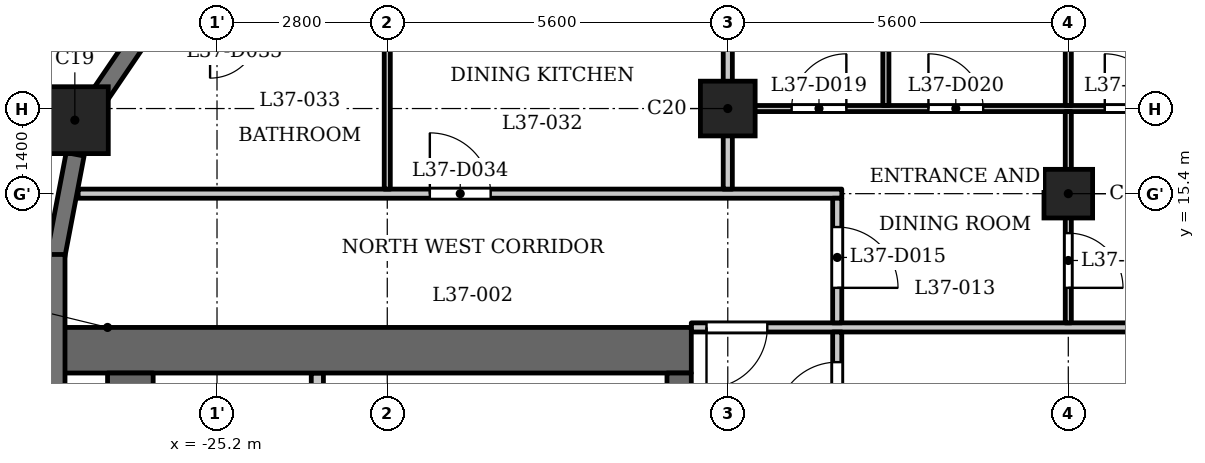
"""IFC4 building model, lengths in metres.
Left out: names, types, materials, properties, quantities, classifications, styles, units other than length and angle.
Written with IfcOpenShell. Run it as: python <this file> out.ifc"""

import sys

from ifc_helpers import new_model, si_unit, direction, frame, frame_2d, origin, origin_2d, place, context, subcontext, project, spatial, rectangle, extrude, element, fill, save


model = new_model("IFC4")
c1 = context("Model", 3, precision=1e-05, world=origin(), true_north=direction((0.0, 1.0)))
c2 = subcontext(c1, "Body", "Model", "MODEL_VIEW")
j1 = project(units=[si_unit("LENGTHUNIT", "METRE"), si_unit("PLANEANGLEUNIT", "RADIAN")], contexts=[c1])
p1 = place(None, origin())
s1 = spatial("IfcSite", under=j1, at=p1, CompositionType="ELEMENT")
p2 = place(p1, origin())
s2 = spatial("IfcBuilding", under=s1, at=p2, CompositionType="ELEMENT")
p3 = place(p2, frame((0.0, 0.0, 146.6)))
s3 = spatial("IfcBuildingStorey", under=s2, at=p3, CompositionType="ELEMENT", Elevation=146.6)
p4 = place(p3, frame((-27.538, 16.609, 0.0), z_axis=(0.0, 0.0, 1.0), x_axis=(1.0, 0.0, 0.0)))
e1 = element("IfcColumn", 1, at=p4, inside=s3, PredefinedType="COLUMN", context=c2, shape_type="SweptSolid", body=[
    extrude(rectangle(XDim=1.1, YDim=1.1, at=origin_2d()), origin(), (0.0, 0.0, 1.0), 3.5),
])
p5 = place(p3, frame((-16.8, 16.8, 0.0), z_axis=(0.0, 0.0, 1.0), x_axis=(1.0, 0.0, 0.0)))
e2 = element("IfcColumn", 2, at=p5, inside=s3, PredefinedType="COLUMN", context=c2, shape_type="SweptSolid", body=[
    extrude(rectangle(XDim=0.9, YDim=0.9, at=origin_2d()), origin(), (0.0, 0.0, 1.0), 3.5),
])
p6 = place(p3, frame((-11.2, 15.4, 0.0), z_axis=(0.0, 0.0, 1.0), x_axis=(1.0, 0.0, 0.0)))
e3 = element("IfcColumn", 3, at=p6, inside=s3, PredefinedType="COLUMN", context=c2, shape_type="SweptSolid", body=[
    extrude(rectangle(XDim=0.8, YDim=0.8, at=origin_2d()), origin(), (0.0, 0.0, 1.0), 3.5),
])
p7 = place(p3, frame((-26.532, 17.893, 0.0), z_axis=(0.0, 0.0, 1.0), x_axis=(-0.562105419172, -0.82706559458, 0.0)))
e4 = element("IfcWall", 4, at=p7, inside=s3, PredefinedType="SOLIDWALL", context=c2, shape_type="SweptSolid", body=[
    extrude(rectangle(XDim=1.077, YDim=0.3, at=frame_2d((0.539, 0.0))), origin(), (0.0, 0.0, 1.0), 3.2),
])
p8 = place(p3, frame((-27.533, 16.048, 0.0), z_axis=(0.0, 0.0, 1.0), x_axis=(-0.187302784601, -0.982302227871, 0.0)))
e5 = element("IfcWall", 5, at=p8, inside=s3, PredefinedType="SOLIDWALL", context=c2, shape_type="SweptSolid", body=[
    extrude(rectangle(XDim=1.706, YDim=0.3, at=frame_2d((0.853, 0.0))), origin(), (0.0, 0.0, 1.0), 2.45),
])
p9 = place(p3, frame((-27.85, 14.4, 0.0), z_axis=(0.0, 0.0, 1.0), x_axis=(0.0, -1.0, 0.0)))
e6 = element("IfcWall", 6, at=p9, inside=s3, PredefinedType="SOLIDWALL", context=c2, shape_type="SweptSolid", body=[
    extrude(rectangle(XDim=2.65, YDim=0.3, at=frame_2d((1.325, 0.0))), origin(), (0.0, 0.0, 1.0), 2.45),
])
p10 = place(p3, frame((-17.4, 12.825, 0.0), z_axis=(0.0, 0.0, 1.0), x_axis=(-1.0, 0.0, 0.0)))
e7 = element("IfcWall", 7, at=p10, inside=s3, PredefinedType="SHEAR", context=c2, shape_type="SweptSolid", body=[
    extrude(rectangle(XDim=10.4, YDim=0.75, at=frame_2d((5.2, 0.0))), origin(), (0.0, 0.0, 1.0), 3.2),
])
p11 = place(p3, frame((-17.6, -12.45, 0.0), z_axis=(0.0, 0.0, 1.0), x_axis=(0.0, 1.0, 0.0)))
e8 = element("IfcWall", 8, at=p11, inside=s3, PredefinedType="SHEAR", context=c2, shape_type="SweptSolid", body=[
    extrude(rectangle(XDim=24.9, YDim=0.4, at=frame_2d((12.45, 0.0))), origin(), (0.0, 0.0, 1.0), 3.2),
])
p12 = place(p11, frame((6.325, 0.0, 0.0)))
e9 = element("IfcOpeningElement", 9, at=p12, cuts=e8, PredefinedType="OPENING", context=c2, shape_type="SweptSolid", body=[
    extrude(rectangle(XDim=0.9, YDim=2.1, at=frame_2d((0.45, 1.05))), frame((0.0, 0.21, 0.0), z_axis=(0.0, -1.0, 0.0), x_axis=(1.0, 0.0, 0.0)), (0.0, 0.0, 1.0), 0.42),
])
p13 = place(p11, frame((9.925, 0.0, 0.0)))
e10 = element("IfcOpeningElement", 10, at=p13, cuts=e8, PredefinedType="OPENING", context=c2, shape_type="SweptSolid", body=[
    extrude(rectangle(XDim=0.9, YDim=2.1, at=frame_2d((0.45, 1.05))), frame((0.0, 0.21, 0.0), z_axis=(0.0, -1.0, 0.0), x_axis=(1.0, 0.0, 0.0)), (0.0, 0.0, 1.0), 0.42),
])
p14 = place(p11, frame((15.6, 0.0, 0.0)))
e11 = element("IfcOpeningElement", 11, at=p14, cuts=e8, PredefinedType="OPENING", context=c2, shape_type="SweptSolid", body=[
    extrude(rectangle(XDim=1.1, YDim=2.1, at=frame_2d((0.55, 1.05))), frame((0.0, 0.21, 0.0), z_axis=(0.0, -1.0, 0.0), x_axis=(1.0, 0.0, 0.0)), (0.0, 0.0, 1.0), 0.42),
])
p15 = place(p11, frame((18.0, 0.0, 0.0)))
e12 = element("IfcOpeningElement", 12, at=p15, cuts=e8, PredefinedType="OPENING", context=c2, shape_type="SweptSolid", body=[
    extrude(rectangle(XDim=1.1, YDim=2.1, at=frame_2d((0.55, 1.05))), frame((0.0, 0.21, 0.0), z_axis=(0.0, -1.0, 0.0), x_axis=(1.0, 0.0, 0.0)), (0.0, 0.0, 1.0), 0.42),
])
p16 = place(p11, frame((23.025, 0.0, 0.0)))
e13 = element("IfcOpeningElement", 13, at=p16, cuts=e8, PredefinedType="OPENING", context=c2, shape_type="SweptSolid", body=[
    extrude(rectangle(XDim=1.1, YDim=2.1, at=frame_2d((0.55, 1.05))), frame((0.0, 0.21, 0.0), z_axis=(0.0, -1.0, 0.0), x_axis=(1.0, 0.0, 0.0)), (0.0, 0.0, 1.0), 0.42),
])
p17 = place(p11, frame((0.775, 0.0, 0.0)))
e14 = element("IfcOpeningElement", 14, at=p17, cuts=e8, PredefinedType="OPENING", context=c2, shape_type="SweptSolid", body=[
    extrude(rectangle(XDim=1.1, YDim=2.1, at=frame_2d((0.55, 1.05))), frame((0.0, 0.21, 0.0), z_axis=(0.0, -1.0, 0.0), x_axis=(1.0, 0.0, 0.0)), (0.0, 0.0, 1.0), 0.42),
])
p18 = place(p11, frame((12.925, 0.0, 0.0)))
e15 = element("IfcOpeningElement", 15, at=p18, cuts=e8, PredefinedType="OPENING", context=c2, shape_type="SweptSolid", body=[
    extrude(rectangle(XDim=1.8, YDim=2.1, at=frame_2d((0.9, 1.05))), frame((0.0, 0.21, 0.0), z_axis=(0.0, -1.0, 0.0), x_axis=(1.0, 0.0, 0.0)), (0.0, 0.0, 1.0), 0.42),
])
p19 = place(p3, frame((-26.625, -12.45, 0.0), z_axis=(0.0, 0.0, 1.0), x_axis=(0.0, 1.0, 0.0)))
e16 = element("IfcWall", 16, at=p19, inside=s3, PredefinedType="SHEAR", context=c2, shape_type="SweptSolid", body=[
    extrude(rectangle(XDim=24.9, YDim=0.75, at=frame_2d((12.45, 0.0))), origin(), (0.0, 0.0, 1.0), 3.2),
])
p20 = place(p3, frame((-23.55, 9.8, 0.0), z_axis=(0.0, 0.0, 1.0), x_axis=(0.0, 1.0, 0.0)))
e17 = element("IfcWall", 17, at=p20, inside=s3, PredefinedType="PARTITIONING", context=c2, shape_type="SweptSolid", body=[
    extrude(rectangle(XDim=2.65, YDim=0.2, at=frame_2d((1.325, 0.0))), origin(), (0.0, 0.0, 1.0), 3.2),
])
p21 = place(p20, frame((0.875, 0.0, 0.0)))
e18 = element("IfcOpeningElement", 18, at=p21, cuts=e17, PredefinedType="OPENING", context=c2, shape_type="SweptSolid", body=[
    extrude(rectangle(XDim=0.9, YDim=2.1, at=frame_2d((0.45, 1.05))), frame((0.0, 0.11, 0.0), z_axis=(0.0, -1.0, 0.0), x_axis=(1.0, 0.0, 0.0)), (0.0, 0.0, 1.0), 0.22),
])
p22 = place(p3, frame((-17.4, 13.2, 0.0), z_axis=(0.0, 0.0, 1.0), x_axis=(1.0, 0.0, 0.0)))
e19 = element("IfcWall", 19, at=p22, inside=s3, PredefinedType="PARTITIONING", context=c2, shape_type="SweptSolid", body=[
    extrude(rectangle(XDim=34.8, YDim=0.15, at=frame_2d((17.4, 0.0))), origin(), (0.0, 0.0, 1.0), 3.2),
])
p23 = place(p22, frame((0.25, 0.0, 0.0)))
e20 = element("IfcOpeningElement", 20, at=p23, cuts=e19, PredefinedType="OPENING", context=c2, shape_type="SweptSolid", body=[
    extrude(rectangle(XDim=1.0, YDim=2.1, at=frame_2d((0.5, 1.05))), frame((0.0, 0.085, 0.0), z_axis=(0.0, -1.0, 0.0), x_axis=(1.0, 0.0, 0.0)), (0.0, 0.0, 1.0), 0.17),
])
p24 = place(p22, frame((33.65, 0.0, 0.0)))
e21 = element("IfcOpeningElement", 21, at=p24, cuts=e19, PredefinedType="OPENING", context=c2, shape_type="SweptSolid", body=[
    extrude(rectangle(XDim=1.0, YDim=2.1, at=frame_2d((0.5, 1.05))), frame((0.0, 0.085, 0.0), z_axis=(0.0, -1.0, 0.0), x_axis=(1.0, 0.0, 0.0)), (0.0, 0.0, 1.0), 0.17),
])
p25 = place(p22, frame((13.75, 0.0, 0.0)))
e22 = element("IfcOpeningElement", 22, at=p25, cuts=e19, PredefinedType="OPENING", context=c2, shape_type="SweptSolid", body=[
    extrude(rectangle(XDim=1.0, YDim=2.1, at=frame_2d((0.5, 1.05))), frame((0.0, 0.085, 0.0), z_axis=(0.0, -1.0, 0.0), x_axis=(1.0, 0.0, 0.0)), (0.0, 0.0, 1.0), 0.17),
])
p26 = place(p3, frame((-27.484, 15.4, 0.0), z_axis=(0.0, 0.0, 1.0), x_axis=(1.0, 0.0, 0.0)))
e23 = element("IfcWall", 23, at=p26, inside=s3, PredefinedType="PARTITIONING", context=c2, shape_type="SweptSolid", body=[
    extrude(rectangle(XDim=12.559, YDim=0.15, at=frame_2d((6.279, 0.0))), origin(), (0.0, 0.0, 1.0), 3.2),
])
p27 = place(p26, frame((5.784, 0.0, 0.0)))
e24 = element("IfcOpeningElement", 24, at=p27, cuts=e23, PredefinedType="OPENING", context=c2, shape_type="SweptSolid", body=[
    extrude(rectangle(XDim=1.0, YDim=2.1, at=frame_2d((0.5, 1.05))), frame((0.0, 0.085, 0.0), z_axis=(0.0, -1.0, 0.0), x_axis=(1.0, 0.0, 0.0)), (0.0, 0.0, 1.0), 0.17),
])
p28 = place(p3, frame((-16.725, 16.8, 0.0), z_axis=(0.0, 0.0, 1.0), x_axis=(1.0, 0.0, 0.0)))
e25 = element("IfcWall", 25, at=p28, inside=s3, PredefinedType="PARTITIONING", context=c2, shape_type="SweptSolid", body=[
    extrude(rectangle(XDim=33.45, YDim=0.1, at=frame_2d((16.725, 0.0))), origin(), (0.0, 0.0, 1.0), 3.2),
])
p29 = place(p28, frame((9.575, 0.0, 0.0)))
e26 = element("IfcOpeningElement", 26, at=p29, cuts=e25, PredefinedType="OPENING", context=c2, shape_type="SweptSolid", body=[
    extrude(rectangle(XDim=0.8, YDim=2.1, at=frame_2d((0.4, 1.05))), frame((0.0, 0.06, 0.0), z_axis=(0.0, -1.0, 0.0), x_axis=(1.0, 0.0, 0.0)), (0.0, 0.0, 1.0), 0.12),
])
p30 = place(p28, frame((6.125, 0.0, 0.0)))
e27 = element("IfcOpeningElement", 27, at=p30, cuts=e25, PredefinedType="OPENING", context=c2, shape_type="SweptSolid", body=[
    extrude(rectangle(XDim=0.9, YDim=2.1, at=frame_2d((0.45, 1.05))), frame((0.0, 0.06, 0.0), z_axis=(0.0, -1.0, 0.0), x_axis=(1.0, 0.0, 0.0)), (0.0, 0.0, 1.0), 0.12),
])
p31 = place(p28, frame((0.975, 0.0, 0.0)))
e28 = element("IfcOpeningElement", 28, at=p31, cuts=e25, PredefinedType="OPENING", context=c2, shape_type="SweptSolid", body=[
    extrude(rectangle(XDim=0.9, YDim=2.1, at=frame_2d((0.45, 1.05))), frame((0.0, 0.06, 0.0), z_axis=(0.0, -1.0, 0.0), x_axis=(1.0, 0.0, 0.0)), (0.0, 0.0, 1.0), 0.12),
])
p32 = place(p28, frame((3.225, 0.0, 0.0)))
e29 = element("IfcOpeningElement", 29, at=p32, cuts=e25, PredefinedType="OPENING", context=c2, shape_type="SweptSolid", body=[
    extrude(rectangle(XDim=0.9, YDim=2.1, at=frame_2d((0.45, 1.05))), frame((0.0, 0.06, 0.0), z_axis=(0.0, -1.0, 0.0), x_axis=(1.0, 0.0, 0.0)), (0.0, 0.0, 1.0), 0.12),
])
p33 = place(p28, frame((15.375, 0.0, 0.0)))
e30 = element("IfcOpeningElement", 30, at=p33, cuts=e25, PredefinedType="OPENING", context=c2, shape_type="SweptSolid", body=[
    extrude(rectangle(XDim=0.8, YDim=2.1, at=frame_2d((0.4, 1.05))), frame((0.0, 0.06, 0.0), z_axis=(0.0, -1.0, 0.0), x_axis=(1.0, 0.0, 0.0)), (0.0, 0.0, 1.0), 0.12),
])
p34 = place(p28, frame((13.175, 0.0, 0.0)))
e31 = element("IfcOpeningElement", 31, at=p34, cuts=e25, PredefinedType="OPENING", context=c2, shape_type="SweptSolid", body=[
    extrude(rectangle(XDim=0.9, YDim=2.1, at=frame_2d((0.45, 1.05))), frame((0.0, 0.06, 0.0), z_axis=(0.0, -1.0, 0.0), x_axis=(1.0, 0.0, 0.0)), (0.0, 0.0, 1.0), 0.12),
])
p35 = place(p28, frame((31.975, 0.0, 0.0)))
e32 = element("IfcOpeningElement", 32, at=p35, cuts=e25, PredefinedType="OPENING", context=c2, shape_type="SweptSolid", body=[
    extrude(rectangle(XDim=0.9, YDim=2.1, at=frame_2d((0.45, 1.05))), frame((0.0, 0.06, 0.0), z_axis=(0.0, -1.0, 0.0), x_axis=(1.0, 0.0, 0.0)), (0.0, 0.0, 1.0), 0.12),
])
p36 = place(p28, frame((22.875, 0.0, 0.0)))
e33 = element("IfcOpeningElement", 33, at=p36, cuts=e25, PredefinedType="OPENING", context=c2, shape_type="SweptSolid", body=[
    extrude(rectangle(XDim=0.9, YDim=2.1, at=frame_2d((0.45, 1.05))), frame((0.0, 0.06, 0.0), z_axis=(0.0, -1.0, 0.0), x_axis=(1.0, 0.0, 0.0)), (0.0, 0.0, 1.0), 0.12),
])
p37 = place(p3, frame((-22.4, 15.475, 0.0), z_axis=(0.0, 0.0, 1.0), x_axis=(0.0, 1.0, 0.0)))
e34 = element("IfcWall", 34, at=p37, inside=s3, PredefinedType="PARTITIONING", context=c2, shape_type="SweptSolid", body=[
    extrude(rectangle(XDim=2.575, YDim=0.1, at=frame_2d((1.288, 0.0))), origin(), (0.0, 0.0, 1.0), 3.2),
])
p38 = place(p3, frame((-16.8, 15.475, 0.0), z_axis=(0.0, 0.0, 1.0), x_axis=(0.0, 1.0, 0.0)))
e35 = element("IfcWall", 35, at=p38, inside=s3, PredefinedType="PARTITIONING", context=c2, shape_type="SweptSolid", body=[
    extrude(rectangle(XDim=7.455, YDim=0.15, at=frame_2d((3.728, 0.0))), origin(), (0.0, 0.0, 1.0), 3.2),
])
p39 = place(p3, frame((-15.0, 6.769, 0.0), z_axis=(0.0, 0.0, 1.0), x_axis=(0.0, 1.0, 0.0)))
e36 = element("IfcWall", 36, at=p39, inside=s3, PredefinedType="PARTITIONING", context=c2, shape_type="SweptSolid", body=[
    extrude(rectangle(XDim=6.356, YDim=0.15, at=frame_2d((3.178, 0.0))), origin(), (0.0, 0.0, 1.0), 3.2),
])
p40 = place(p39, frame((4.86, 0.0, 0.0)))
e37 = element("IfcOpeningElement", 37, at=p40, cuts=e36, PredefinedType="OPENING", context=c2, shape_type="SweptSolid", body=[
    extrude(rectangle(XDim=1.0, YDim=2.1, at=frame_2d((0.5, 1.05))), frame((0.0, 0.085, 0.0), z_axis=(0.0, -1.0, 0.0), x_axis=(1.0, 0.0, 0.0)), (0.0, 0.0, 1.0), 0.17),
])
p41 = place(p3, frame((-15.0, 13.275, 0.0), z_axis=(0.0, 0.0, 1.0), x_axis=(0.0, 1.0, 0.0)))
e38 = element("IfcWall", 38, at=p41, inside=s3, PredefinedType="PARTITIONING", context=c2, shape_type="SweptSolid", body=[
    extrude(rectangle(XDim=2.05, YDim=0.15, at=frame_2d((1.025, 0.0))), origin(), (0.0, 0.0, 1.0), 3.2),
])
p42 = place(p41, frame((0.576, 0.0, 0.0)))
e39 = element("IfcOpeningElement", 39, at=p42, cuts=e38, PredefinedType="OPENING", context=c2, shape_type="SweptSolid", body=[
    extrude(rectangle(XDim=1.0, YDim=2.1, at=frame_2d((0.5, 1.05))), frame((0.0, 0.085, 0.0), z_axis=(0.0, -1.0, 0.0), x_axis=(1.0, 0.0, 0.0)), (0.0, 0.0, 1.0), 0.17),
])
p43 = place(p3, frame((-14.2, 16.85, 0.0), z_axis=(0.0, 0.0, 1.0), x_axis=(0.0, 1.0, 0.0)))
e40 = element("IfcWall", 40, at=p43, inside=s3, PredefinedType="PARTITIONING", context=c2, shape_type="SweptSolid", body=[
    extrude(rectangle(XDim=5.23, YDim=0.1, at=frame_2d((2.615, 0.0))), origin(), (0.0, 0.0, 1.0), 3.2),
])
p44 = place(p3, frame((-11.2, 13.275, 0.0), z_axis=(0.0, 0.0, 1.0), x_axis=(0.0, 1.0, 0.0)))
e41 = element("IfcWall", 41, at=p44, inside=s3, PredefinedType="PARTITIONING", context=c2, shape_type="SweptSolid", body=[
    extrude(rectangle(XDim=3.475, YDim=0.1, at=frame_2d((1.738, 0.0))), origin(), (0.0, 0.0, 1.0), 3.2),
])
p45 = place(p44, frame((0.576, 0.0, 0.0)))
e42 = element("IfcOpeningElement", 42, at=p45, cuts=e41, PredefinedType="OPENING", context=c2, shape_type="SweptSolid", body=[
    extrude(rectangle(XDim=0.9, YDim=2.1, at=frame_2d((0.45, 1.05))), frame((0.0, 0.06, 0.0), z_axis=(0.0, -1.0, 0.0), x_axis=(1.0, 0.0, 0.0)), (0.0, 0.0, 1.0), 0.12),
])
p46 = place(p3, frame((-11.2, 16.85, 0.0), z_axis=(0.0, 0.0, 1.0), x_axis=(0.0, 1.0, 0.0)))
e43 = element("IfcWall", 43, at=p46, inside=s3, PredefinedType="PARTITIONING", context=c2, shape_type="SweptSolid", body=[
    extrude(rectangle(XDim=6.08, YDim=0.1, at=frame_2d((3.04, 0.0))), origin(), (0.0, 0.0, 1.0), 3.2),
])
p47 = place(p40, origin())
e44 = element("IfcDoor", 44, at=p47, inside=s3, OperationType="SINGLE_SWING_RIGHT", PredefinedType="DOOR", context=c2, shape_type="SweptSolid", body=[
    extrude(rectangle(XDim=1.0, YDim=2.1, at=frame_2d((0.5, 1.05))), frame((0.0, 0.025, 0.0), z_axis=(0.0, -1.0, 0.0), x_axis=(1.0, 0.0, 0.0)), (0.0, 0.0, 1.0), 0.05),
])
fill(e37, e44)
p48 = place(p23, origin())
e45 = element("IfcDoor", 45, at=p48, inside=s3, OperationType="SINGLE_SWING_LEFT", PredefinedType="DOOR", context=c2, shape_type="SweptSolid", body=[
    extrude(rectangle(XDim=1.0, YDim=2.1, at=frame_2d((0.5, 1.05))), frame((0.0, 0.025, 0.0), z_axis=(0.0, -1.0, 0.0), x_axis=(1.0, 0.0, 0.0)), (0.0, 0.0, 1.0), 0.05),
])
fill(e20, e45)
p49 = place(p42, origin())
e46 = element("IfcDoor", 46, at=p49, inside=s3, OperationType="SINGLE_SWING_LEFT", PredefinedType="DOOR", context=c2, shape_type="SweptSolid", body=[
    extrude(rectangle(XDim=1.0, YDim=2.1, at=frame_2d((0.5, 1.05))), frame((0.0, 0.025, 0.0), z_axis=(0.0, -1.0, 0.0), x_axis=(1.0, 0.0, 0.0)), (0.0, 0.0, 1.0), 0.05),
])
fill(e39, e46)
p50 = place(p45, origin())
e47 = element("IfcDoor", 47, at=p50, inside=s3, OperationType="SINGLE_SWING_LEFT", PredefinedType="DOOR", context=c2, shape_type="SweptSolid", body=[
    extrude(rectangle(XDim=0.9, YDim=2.1, at=frame_2d((0.45, 1.05))), frame((0.0, 0.025, 0.0), z_axis=(0.0, -1.0, 0.0), x_axis=(1.0, 0.0, 0.0)), (0.0, 0.0, 1.0), 0.05),
])
fill(e42, e47)
p51 = place(p30, origin())
e48 = element("IfcDoor", 48, at=p51, inside=s3, OperationType="SINGLE_SWING_RIGHT", PredefinedType="DOOR", context=c2, shape_type="SweptSolid", body=[
    extrude(rectangle(XDim=0.9, YDim=2.1, at=frame_2d((0.45, 1.05))), frame((0.0, 0.025, 0.0), z_axis=(0.0, -1.0, 0.0), x_axis=(1.0, 0.0, 0.0)), (0.0, 0.0, 1.0), 0.05),
])
fill(e27, e48)
p52 = place(p31, origin())
e49 = element("IfcDoor", 49, at=p52, inside=s3, OperationType="SINGLE_SWING_LEFT", PredefinedType="DOOR", context=c2, shape_type="SweptSolid", body=[
    extrude(rectangle(XDim=0.9, YDim=2.1, at=frame_2d((0.45, 1.05))), frame((0.0, 0.025, 0.0), z_axis=(0.0, -1.0, 0.0), x_axis=(1.0, 0.0, 0.0)), (0.0, 0.0, 1.0), 0.05),
])
fill(e28, e49)
p53 = place(p32, origin())
e50 = element("IfcDoor", 50, at=p53, inside=s3, OperationType="SINGLE_SWING_RIGHT", PredefinedType="DOOR", context=c2, shape_type="SweptSolid", body=[
    extrude(rectangle(XDim=0.9, YDim=2.1, at=frame_2d((0.45, 1.05))), frame((0.0, 0.025, 0.0), z_axis=(0.0, -1.0, 0.0), x_axis=(1.0, 0.0, 0.0)), (0.0, 0.0, 1.0), 0.05),
])
fill(e29, e50)
p54 = place(p27, origin())
e51 = element("IfcDoor", 51, at=p54, inside=s3, OperationType="SINGLE_SWING_RIGHT", PredefinedType="DOOR", context=c2, shape_type="SweptSolid", body=[
    extrude(rectangle(XDim=1.0, YDim=2.1, at=frame_2d((0.5, 1.05))), frame((0.0, 0.025, 0.0), z_axis=(0.0, -1.0, 0.0), x_axis=(1.0, 0.0, 0.0)), (0.0, 0.0, 1.0), 0.05),
])
fill(e24, e51)
save(model, sys.argv[1])
